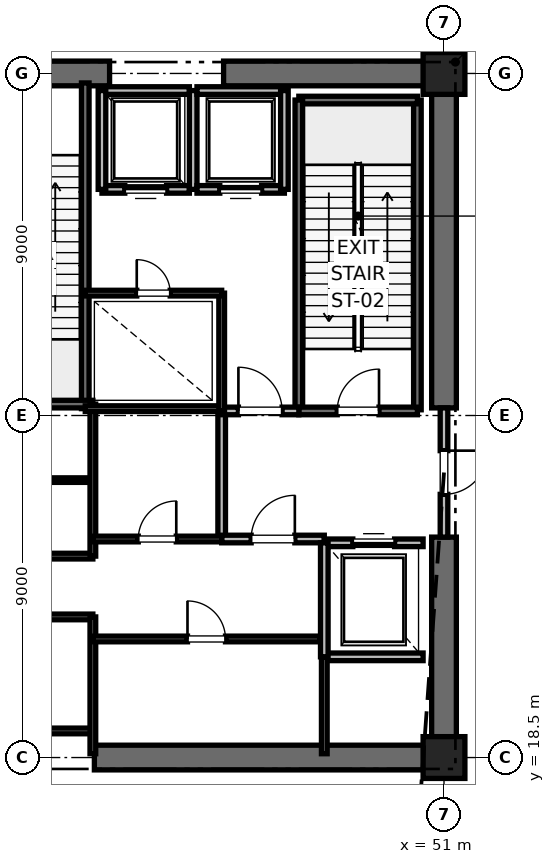
"""IFC4 building model, lengths in metres.
Left out: names, types, materials, properties, quantities, classifications, styles, units other than length and angle.
Written with IfcOpenShell. Run it as: python <this file> out.ifc"""

import sys

from ifc_helpers import new_model, si_unit, direction, frame, frame_2d, origin, origin_2d, place, context, subcontext, project, spatial, rectangle, extrude, element, fill, save


model = new_model("IFC4")
c1 = context("Model", 3, precision=1e-05, world=origin(), true_north=direction((0.0, 1.0)))
c2 = subcontext(c1, "Body", "Model", "MODEL_VIEW")
j1 = project(units=[si_unit("LENGTHUNIT", "METRE"), si_unit("PLANEANGLEUNIT", "RADIAN")], contexts=[c1])
p1 = place(None, origin())
s1 = spatial("IfcSite", under=j1, at=p1, CompositionType="ELEMENT")
p2 = place(p1, origin())
s2 = spatial("IfcBuilding", under=s1, at=p2, CompositionType="ELEMENT")
p3 = place(p2, origin())
s3 = spatial("IfcBuildingStorey", under=s2, at=p3, CompositionType="ELEMENT", Elevation=0.0)
for number, where, z_axis, x_axis in (
    (1, (51.0, 18.5, 0.0), (0.0, 0.0, 1.0), (1.0, 0.0, 0.0)),
    (2, (51.0, 36.5, 0.0), (0.0, 0.0, 1.0), (1.0, 0.0, 0.0)),
):
    element("IfcColumn", number, at=place(p3, frame(where, z_axis=z_axis, x_axis=x_axis)), inside=s3, PredefinedType="PILASTER", context=c2, shape_type="SweptSolid", body=[
        extrude(rectangle(XDim=1.1, YDim=1.1, at=origin_2d()), origin(), (0.0, 0.0, 1.0), 6.0),
    ])
p4 = place(p3, frame((41.8, 18.5, 0.0), z_axis=(0.0, 0.0, 1.0), x_axis=(1.0, 0.0, 0.0)))
e3 = element("IfcWall", 3, at=p4, inside=s3, PredefinedType="SHEAR", context=c2, shape_type="SweptSolid", body=[
    extrude(rectangle(XDim=9.2, YDim=0.65, at=frame_2d((4.6, 0.0))), origin(), (0.0, 0.0, 1.0), 5.72),
])
p5 = place(p3, frame((37.8, 36.5, 0.0), z_axis=(0.0, 0.0, 1.0), x_axis=(1.0, 0.0, 0.0)))
e4 = element("IfcWall", 4, at=p5, inside=s3, PredefinedType="SHEAR", context=c2, shape_type="SweptSolid", body=[
    extrude(rectangle(XDim=4.4, YDim=0.65, at=frame_2d((2.2, 0.0))), origin(), (0.0, 0.0, 1.0), 5.72),
])
p6 = place(p5, frame((1.65, 0.0, 0.0)))
e5 = element("IfcOpeningElement", 5, at=p6, cuts=e4, PredefinedType="OPENING", context=c2, shape_type="SweptSolid", body=[
    extrude(rectangle(XDim=1.1, YDim=2.15, at=frame_2d((0.55, 1.075))), frame((0.0, 0.325, 0.0), z_axis=(0.0, -1.0, 0.0), x_axis=(1.0, 0.0, 0.0)), (0.0, 0.0, 1.0), 0.65),
])
for number, where, z_axis, x_axis in (
    (6, (45.2, 36.5, 0.0), (0.0, 0.0, 1.0), (1.0, 0.0, 0.0)),
    (7, (51.0, 18.5, 0.0), (0.0, 0.0, 1.0), (0.0, 1.0, 0.0)),
):
    element("IfcWall", number, at=place(p3, frame(where, z_axis=z_axis, x_axis=x_axis)), inside=s3, PredefinedType="SHEAR", context=c2, shape_type="SweptSolid", body=[
        extrude(rectangle(XDim=5.8, YDim=0.65, at=frame_2d((2.9, 0.0))), origin(), (0.0, 0.0, 1.0), 5.72),
    ])
p7 = place(p3, frame((51.0, 27.7, 0.0), z_axis=(0.0, 0.0, 1.0), x_axis=(0.0, 1.0, 0.0)))
e8 = element("IfcWall", 8, at=p7, inside=s3, PredefinedType="SHEAR", context=c2, shape_type="SweptSolid", body=[
    extrude(rectangle(XDim=8.8, YDim=0.65, at=frame_2d((4.4, 0.0))), origin(), (0.0, 0.0, 1.0), 5.72),
])
p8 = place(p3, frame((50.3, 27.65, 0.0), z_axis=(0.0, 0.0, 1.0), x_axis=(0.0, 1.0, 0.0)))
e9 = element("IfcWall", 9, at=p8, inside=s3, PredefinedType="SOLIDWALL", context=c2, shape_type="SweptSolid", body=[
    extrude(rectangle(XDim=8.15, YDim=0.2, at=frame_2d((4.075, 0.0))), origin(), (0.0, 0.0, 1.0), 5.72),
])
p9 = place(p3, frame((47.18, 35.8, 0.0), z_axis=(0.0, 0.0, 1.0), x_axis=(1.0, 0.0, 0.0)))
e10 = element("IfcWall", 10, at=p9, inside=s3, PredefinedType="SOLIDWALL", context=c2, shape_type="SweptSolid", body=[
    extrude(rectangle(XDim=3.12, YDim=0.2, at=frame_2d((1.56, 0.0))), origin(), (0.0, 0.0, 1.0), 5.72),
])
p10 = place(p3, frame((47.18, 27.62, 0.0), z_axis=(0.0, 0.0, 1.0), x_axis=(0.0, 1.0, 0.0)))
e11 = element("IfcWall", 11, at=p10, inside=s3, PredefinedType="SOLIDWALL", context=c2, shape_type="SweptSolid", body=[
    extrude(rectangle(XDim=8.18, YDim=0.2, at=frame_2d((4.09, 0.0))), origin(), (0.0, 0.0, 1.0), 5.72),
])
p11 = place(p3, frame((47.18, 27.62, 0.0), z_axis=(0.0, 0.0, 1.0), x_axis=(1.0, 0.0, 0.0)))
e12 = element("IfcWall", 12, at=p11, inside=s3, PredefinedType="SOLIDWALL", context=c2, shape_type="SweptSolid", body=[
    extrude(rectangle(XDim=3.12, YDim=0.2, at=frame_2d((1.56, 0.0))), origin(), (0.0, 0.0, 1.0), 5.72),
])
p12 = place(p11, frame((1.01, 0.0, 0.0)))
e13 = element("IfcOpeningElement", 13, at=p12, cuts=e12, PredefinedType="OPENING", context=c2, shape_type="SweptSolid", body=[
    extrude(rectangle(XDim=1.1, YDim=2.15, at=frame_2d((0.55, 1.075))), frame((0.0, 0.1, 0.0), z_axis=(0.0, -1.0, 0.0), x_axis=(1.0, 0.0, 0.0)), (0.0, 0.0, 1.0), 0.2),
])
p13 = place(p3, frame((41.56, 27.68, 0.0), z_axis=(0.0, 0.0, 1.0), x_axis=(0.0, 1.0, 0.0)))
e14 = element("IfcWall", 14, at=p13, inside=s3, PredefinedType="SOLIDWALL", context=c2, shape_type="SweptSolid", body=[
    extrude(rectangle(XDim=8.57, YDim=0.2, at=frame_2d((4.285, 0.0))), origin(), (0.0, 0.0, 1.0), 5.72),
])
p14 = place(p3, frame((38.44, 27.8, 0.0), z_axis=(0.0, 0.0, 1.0), x_axis=(1.0, 0.0, 0.0)))
e15 = element("IfcWall", 15, at=p14, inside=s3, PredefinedType="SOLIDWALL", context=c2, shape_type="SweptSolid", body=[
    extrude(rectangle(XDim=3.32, YDim=0.2, at=frame_2d((1.66, 0.0))), origin(), (0.0, 0.0, 1.0), 5.72),
])
p15 = place(p3, frame((45.15, 24.25, 0.0), z_axis=(0.0, 0.0, 1.0), x_axis=(0.0, 1.0, 0.0)))
e16 = element("IfcWall", 16, at=p15, inside=s3, PredefinedType="PARTITIONING", context=c2, shape_type="SweptSolid", body=[
    extrude(rectangle(XDim=3.37, YDim=0.2, at=frame_2d((1.685, 0.0))), origin(), (0.0, 0.0, 1.0), 5.72),
])
p16 = place(p3, frame((45.15, 24.25, 0.0), z_axis=(0.0, 0.0, 1.0), x_axis=(1.0, 0.0, 0.0)))
e17 = element("IfcWall", 17, at=p16, inside=s3, PredefinedType="PARTITIONING", context=c2, shape_type="SweptSolid", body=[
    extrude(rectangle(XDim=2.7, YDim=0.2, at=frame_2d((1.35, 0.0))), origin(), (0.0, 0.0, 1.0), 5.72),
])
p17 = place(p16, frame((0.775, 0.0, 0.0)))
e18 = element("IfcOpeningElement", 18, at=p17, cuts=e17, PredefinedType="OPENING", context=c2, shape_type="SweptSolid", body=[
    extrude(rectangle(XDim=1.15, YDim=2.2, at=frame_2d((0.575, 1.1))), frame((0.0, 0.1, 0.0), z_axis=(0.0, -1.0, 0.0), x_axis=(1.0, 0.0, 0.0)), (0.0, 0.0, 1.0), 0.2),
])
p18 = place(p3, frame((45.15, 27.62, 0.0), z_axis=(0.0, 0.0, 1.0), x_axis=(1.0, 0.0, 0.0)))
e19 = element("IfcWall", 19, at=p18, inside=s3, PredefinedType="PARTITIONING", context=c2, shape_type="SweptSolid", body=[
    extrude(rectangle(XDim=2.03, YDim=0.2, at=frame_2d((1.015, 0.0))), origin(), (0.0, 0.0, 1.0), 5.72),
])
p19 = place(p18, frame((0.44, 0.0, 0.0)))
e20 = element("IfcOpeningElement", 20, at=p19, cuts=e19, PredefinedType="OPENING", context=c2, shape_type="SweptSolid", body=[
    extrude(rectangle(XDim=1.15, YDim=2.2, at=frame_2d((0.575, 1.1))), frame((0.0, 0.1, 0.0), z_axis=(0.0, -1.0, 0.0), x_axis=(1.0, 0.0, 0.0)), (0.0, 0.0, 1.0), 0.2),
])
p20 = place(p3, frame((51.0, 27.7, 0.0), z_axis=(0.0, 0.0, 1.0), x_axis=(0.0, -1.0, 0.0)))
e21 = element("IfcWall", 21, at=p20, inside=s3, PredefinedType="PARTITIONING", context=c2, shape_type="SweptSolid", body=[
    extrude(rectangle(XDim=3.4, YDim=0.2, at=frame_2d((1.7, 0.0))), origin(), (0.0, 0.0, 1.0), 4.5),
])
p21 = place(p20, frame((1.125, 0.0, 0.0)))
e22 = element("IfcOpeningElement", 22, at=p21, cuts=e21, PredefinedType="OPENING", context=c2, shape_type="SweptSolid", body=[
    extrude(rectangle(XDim=1.15, YDim=2.2, at=frame_2d((0.575, 1.1))), frame((0.0, 0.1, 0.0), z_axis=(0.0, -1.0, 0.0), x_axis=(1.0, 0.0, 0.0)), (0.0, 0.0, 1.0), 0.2),
])
p22 = place(p3, frame((47.85, 21.15, 0.0), z_axis=(0.0, 0.0, 1.0), x_axis=(1.0, 0.0, 0.0)))
e23 = element("IfcWall", 23, at=p22, inside=s3, PredefinedType="SOLIDWALL", context=c2, shape_type="SweptSolid", body=[
    extrude(rectangle(XDim=2.6, YDim=0.2, at=frame_2d((1.3, 0.0))), origin(), (0.0, 0.0, 1.0), 5.72),
])
p23 = place(p3, frame((50.45, 24.15, 0.0), z_axis=(0.0, 0.0, 1.0), x_axis=(-1.0, 0.0, 0.0)))
e24 = element("IfcWall", 24, at=p23, inside=s3, PredefinedType="SOLIDWALL", context=c2, shape_type="SweptSolid", body=[
    extrude(rectangle(XDim=2.6, YDim=0.2, at=frame_2d((1.3, 0.0))), origin(), (0.0, 0.0, 1.0), 4.5),
])
p24 = place(p23, frame((0.75, 0.0, 0.0)))
e25 = element("IfcOpeningElement", 25, at=p24, cuts=e24, PredefinedType="OPENING", context=c2, shape_type="SweptSolid", body=[
    extrude(rectangle(XDim=1.1, YDim=2.2, at=frame_2d((0.55, 1.1))), frame((0.0, 0.1, 0.0), z_axis=(0.0, -1.0, 0.0), x_axis=(1.0, 0.0, 0.0)), (0.0, 0.0, 1.0), 0.2),
])
p25 = place(p3, frame((47.85, 24.15, 0.0), z_axis=(0.0, 0.0, 1.0), x_axis=(0.0, -1.0, 0.0)))
e26 = element("IfcWall", 26, at=p25, inside=s3, PredefinedType="SOLIDWALL", context=c2, shape_type="SweptSolid", body=[
    extrude(rectangle(XDim=3.0, YDim=0.2, at=frame_2d((1.5, 0.0))), origin(), (0.0, 0.0, 1.0), 5.72),
])
p26 = place(p3, frame((42.0, 33.45, 0.0), z_axis=(0.0, 0.0, 1.0), x_axis=(1.0, 0.0, 0.0)))
e27 = element("IfcWall", 27, at=p26, inside=s3, PredefinedType="SOLIDWALL", context=c2, shape_type="SweptSolid", body=[
    extrude(rectangle(XDim=2.3, YDim=0.2, at=frame_2d((1.15, 0.0))), origin(), (0.0, 0.0, 1.0), 5.72),
])
p27 = place(p26, frame((0.6, 0.0, 0.0)))
e28 = element("IfcOpeningElement", 28, at=p27, cuts=e27, PredefinedType="OPENING", context=c2, shape_type="SweptSolid", body=[
    extrude(rectangle(XDim=1.1, YDim=2.2, at=frame_2d((0.55, 1.1))), frame((0.0, 0.1, 0.0), z_axis=(0.0, -1.0, 0.0), x_axis=(1.0, 0.0, 0.0)), (0.0, 0.0, 1.0), 0.2),
])
p28 = place(p3, frame((44.3, 36.05, 0.0), z_axis=(0.0, 0.0, 1.0), x_axis=(-1.0, 0.0, 0.0)))
e29 = element("IfcWall", 29, at=p28, inside=s3, PredefinedType="SOLIDWALL", context=c2, shape_type="SweptSolid", body=[
    extrude(rectangle(XDim=2.3, YDim=0.2, at=frame_2d((1.15, 0.0))), origin(), (0.0, 0.0, 1.0), 4.5),
])
for number, where, z_axis, x_axis in (
    (30, (42.0, 36.05, 0.0), (0.0, 0.0, 1.0), (0.0, -1.0, 0.0)),
    (31, (44.4, 33.45, 0.0), (0.0, 0.0, 1.0), (0.0, 1.0, 0.0)),
):
    element("IfcWall", number, at=place(p3, frame(where, z_axis=z_axis, x_axis=x_axis)), inside=s3, PredefinedType="SOLIDWALL", context=c2, shape_type="SweptSolid", body=[
        extrude(rectangle(XDim=2.6, YDim=0.2, at=frame_2d((1.3, 0.0))), origin(), (0.0, 0.0, 1.0), 4.5),
    ])
p29 = place(p3, frame((44.5, 33.45, 0.0), z_axis=(0.0, 0.0, 1.0), x_axis=(1.0, 0.0, 0.0)))
e32 = element("IfcWall", 32, at=p29, inside=s3, PredefinedType="SOLIDWALL", context=c2, shape_type="SweptSolid", body=[
    extrude(rectangle(XDim=2.3, YDim=0.2, at=frame_2d((1.15, 0.0))), origin(), (0.0, 0.0, 1.0), 5.72),
])
p30 = place(p29, frame((0.6, 0.0, 0.0)))
e33 = element("IfcOpeningElement", 33, at=p30, cuts=e32, PredefinedType="OPENING", context=c2, shape_type="SweptSolid", body=[
    extrude(rectangle(XDim=1.1, YDim=2.2, at=frame_2d((0.55, 1.1))), frame((0.0, 0.1, 0.0), z_axis=(0.0, -1.0, 0.0), x_axis=(1.0, 0.0, 0.0)), (0.0, 0.0, 1.0), 0.2),
])
p31 = place(p3, frame((46.8, 36.05, 0.0), z_axis=(0.0, 0.0, 1.0), x_axis=(-1.0, 0.0, 0.0)))
e34 = element("IfcWall", 34, at=p31, inside=s3, PredefinedType="SOLIDWALL", context=c2, shape_type="SweptSolid", body=[
    extrude(rectangle(XDim=2.3, YDim=0.2, at=frame_2d((1.15, 0.0))), origin(), (0.0, 0.0, 1.0), 4.5),
])
p32 = place(p3, frame((46.8, 33.45, 0.0), z_axis=(0.0, 0.0, 1.0), x_axis=(0.0, 1.0, 0.0)))
e35 = element("IfcWall", 35, at=p32, inside=s3, PredefinedType="SOLIDWALL", context=c2, shape_type="SweptSolid", body=[
    extrude(rectangle(XDim=2.6, YDim=0.2, at=frame_2d((1.3, 0.0))), origin(), (0.0, 0.0, 1.0), 5.72),
])
for number, where, z_axis, x_axis in (
    (36, (39.95, 19.2, 0.0), (0.0, 0.0, 1.0), (1.0, 0.0, 0.0)),
    (37, (39.95, 22.2, 0.0), (0.0, 0.0, 1.0), (1.0, 0.0, 0.0)),
    (38, (39.95, 23.8, 0.0), (0.0, 0.0, 1.0), (1.0, 0.0, 0.0)),
):
    element("IfcWall", number, at=place(p3, frame(where, z_axis=z_axis, x_axis=x_axis)), inside=s3, PredefinedType="PARTITIONING", context=c2, shape_type="SweptSolid", body=[
        extrude(rectangle(XDim=1.81, YDim=0.15, at=frame_2d((0.905, 0.0))), origin(), (0.0, 0.0, 1.0), 2.85),
    ])
p33 = place(p3, frame((39.95, 25.8, 0.0), z_axis=(0.0, 0.0, 1.0), x_axis=(1.0, 0.0, 0.0)))
e39 = element("IfcWall", 39, at=p33, inside=s3, PredefinedType="PARTITIONING", context=c2, shape_type="SweptSolid", body=[
    extrude(rectangle(XDim=1.81, YDim=0.12, at=frame_2d((0.905, 0.0))), origin(), (0.0, 0.0, 1.0), 2.85),
])
p34 = place(p3, frame((41.76, 18.6, 0.0), z_axis=(0.0, 0.0, 1.0), x_axis=(0.0, 1.0, 0.0)))
e40 = element("IfcWall", 40, at=p34, inside=s3, PredefinedType="PARTITIONING", context=c2, shape_type="SweptSolid", body=[
    extrude(rectangle(XDim=3.6, YDim=0.15, at=frame_2d((1.8, 0.0))), origin(), (0.0, 0.0, 1.0), 2.85),
])
p35 = place(p3, frame((41.76, 23.8, 0.0), z_axis=(0.0, 0.0, 1.0), x_axis=(0.0, 1.0, 0.0)))
e41 = element("IfcWall", 41, at=p35, inside=s3, PredefinedType="PARTITIONING", context=c2, shape_type="SweptSolid", body=[
    extrude(rectangle(XDim=4.0, YDim=0.15, at=frame_2d((2.0, 0.0))), origin(), (0.0, 0.0, 1.0), 2.85),
])
p36 = place(p3, frame((41.56, 27.68, 0.0), z_axis=(0.0, 0.0, 1.0), x_axis=(1.0, 0.0, 0.0)))
e42 = element("IfcWall", 42, at=p36, inside=s3, PredefinedType="PARTITIONING", context=c2, shape_type="SweptSolid", body=[
    extrude(rectangle(XDim=3.59, YDim=0.15, at=frame_2d((1.795, 0.0))), origin(), (0.0, 0.0, 1.0), 2.85),
])
p37 = place(p3, frame((47.85, 18.6, 0.0), z_axis=(0.0, 0.0, 1.0), x_axis=(0.0, 1.0, 0.0)))
e43 = element("IfcWall", 43, at=p37, inside=s3, PredefinedType="PARTITIONING", context=c2, shape_type="SweptSolid", body=[
    extrude(rectangle(XDim=2.54, YDim=0.15, at=frame_2d((1.27, 0.0))), origin(), (0.0, 0.0, 1.0), 2.85),
])
p38 = place(p3, frame((41.76, 21.62, 0.0), z_axis=(0.0, 0.0, 1.0), x_axis=(1.0, 0.0, 0.0)))
e44 = element("IfcWall", 44, at=p38, inside=s3, PredefinedType="PARTITIONING", context=c2, shape_type="SweptSolid", body=[
    extrude(rectangle(XDim=5.98, YDim=0.15, at=frame_2d((2.99, 0.0))), origin(), (0.0, 0.0, 1.0), 2.85),
])
p39 = place(p38, frame((2.49, 0.0, 0.0)))
e45 = element("IfcOpeningElement", 45, at=p39, cuts=e44, PredefinedType="OPENING", context=c2, shape_type="SweptSolid", body=[
    extrude(rectangle(XDim=1.0, YDim=2.15, at=frame_2d((0.5, 1.075))), frame((0.0, 0.075, 0.0), z_axis=(0.0, -1.0, 0.0), x_axis=(1.0, 0.0, 0.0)), (0.0, 0.0, 1.0), 0.15),
])
p40 = place(p3, frame((41.76, 24.25, 0.0), z_axis=(0.0, 0.0, 1.0), x_axis=(1.0, 0.0, 0.0)))
e46 = element("IfcWall", 46, at=p40, inside=s3, PredefinedType="PARTITIONING", context=c2, shape_type="SweptSolid", body=[
    extrude(rectangle(XDim=3.39, YDim=0.15, at=frame_2d((1.695, 0.0))), origin(), (0.0, 0.0, 1.0), 2.85),
])
p41 = place(p40, frame((1.195, 0.0, 0.0)))
e47 = element("IfcOpeningElement", 47, at=p41, cuts=e46, PredefinedType="OPENING", context=c2, shape_type="SweptSolid", body=[
    extrude(rectangle(XDim=1.0, YDim=2.15, at=frame_2d((0.5, 1.075))), frame((0.0, 0.075, 0.0), z_axis=(0.0, -1.0, 0.0), x_axis=(1.0, 0.0, 0.0)), (0.0, 0.0, 1.0), 0.15),
])
p42 = place(p3, frame((45.15, 27.62, 0.0), z_axis=(0.0, 0.0, 1.0), x_axis=(0.0, 1.0, 0.0)))
e48 = element("IfcWall", 48, at=p42, inside=s3, PredefinedType="PARTITIONING", context=c2, shape_type="SweptSolid", body=[
    extrude(rectangle(XDim=3.1, YDim=0.15, at=frame_2d((1.55, 0.0))), origin(), (0.0, 0.0, 1.0), 2.85),
])
p43 = place(p3, frame((41.56, 30.72, 0.0), z_axis=(0.0, 0.0, 1.0), x_axis=(1.0, 0.0, 0.0)))
e49 = element("IfcWall", 49, at=p43, inside=s3, PredefinedType="PARTITIONING", context=c2, shape_type="SweptSolid", body=[
    extrude(rectangle(XDim=3.59, YDim=0.15, at=frame_2d((1.795, 0.0))), origin(), (0.0, 0.0, 1.0), 2.85),
])
p44 = place(p43, frame((1.355, 0.0, 0.0)))
e50 = element("IfcOpeningElement", 50, at=p44, cuts=e49, PredefinedType="OPENING", context=c2, shape_type="SweptSolid", body=[
    extrude(rectangle(XDim=0.88, YDim=2.1, at=frame_2d((0.44, 1.05))), frame((0.0, 0.075, 0.0), z_axis=(0.0, -1.0, 0.0), x_axis=(1.0, 0.0, 0.0)), (0.0, 0.0, 1.0), 0.15),
])
p45 = place(p3, frame((51.18, 39.35, 0.0), z_axis=(0.0, 0.0, 1.0), x_axis=(0.0, -1.0, 0.0)))
e51 = element("IfcWall", 51, at=p45, inside=s3, PredefinedType="PARTITIONING", context=c2, shape_type="SweptSolid", body=[
    extrude(rectangle(XDim=2.75, YDim=0.15, at=frame_2d((1.375, 0.0))), origin(), (0.0, 0.0, 1.0), 2.85),
])
p46 = place(p45, frame((0.8, 0.0, 0.0)))
e52 = element("IfcOpeningElement", 52, at=p46, cuts=e51, PredefinedType="OPENING", context=c2, shape_type="SweptSolid", body=[
    extrude(rectangle(XDim=1.15, YDim=2.2, at=frame_2d((0.575, 1.1))), frame((0.0, 0.075, 0.0), z_axis=(0.0, -1.0, 0.0), x_axis=(1.0, 0.0, 0.0)), (0.0, 0.0, 1.0), 0.15),
])
p47 = place(p12, origin())
e53 = element("IfcDoor", 53, at=p47, inside=s3, OperationType="SINGLE_SWING_RIGHT", PredefinedType="DOOR", context=c2, shape_type="SweptSolid", body=[
    extrude(rectangle(XDim=1.1, YDim=2.15, at=frame_2d((0.55, 1.075))), frame((0.0, 0.025, 0.0), z_axis=(0.0, -1.0, 0.0), x_axis=(1.0, 0.0, 0.0)), (0.0, 0.0, 1.0), 0.05),
])
fill(e13, e53)
p48 = place(p17, origin())
e54 = element("IfcDoor", 54, at=p48, inside=s3, OperationType="SINGLE_SWING_RIGHT", PredefinedType="DOOR", context=c2, shape_type="SweptSolid", body=[
    extrude(rectangle(XDim=1.15, YDim=2.2, at=frame_2d((0.575, 1.1))), frame((0.0, 0.025, 0.0), z_axis=(0.0, -1.0, 0.0), x_axis=(1.0, 0.0, 0.0)), (0.0, 0.0, 1.0), 0.05),
])
fill(e18, e54)
p49 = place(p19, origin())
e55 = element("IfcDoor", 55, at=p49, inside=s3, OperationType="SINGLE_SWING_LEFT", PredefinedType="DOOR", context=c2, shape_type="SweptSolid", body=[
    extrude(rectangle(XDim=1.15, YDim=2.2, at=frame_2d((0.575, 1.1))), frame((0.0, 0.025, 0.0), z_axis=(0.0, -1.0, 0.0), x_axis=(1.0, 0.0, 0.0)), (0.0, 0.0, 1.0), 0.05),
])
fill(e20, e55)
p50 = place(p21, origin())
e56 = element("IfcDoor", 56, at=p50, inside=s3, OperationType="SINGLE_SWING_LEFT", PredefinedType="DOOR", context=c2, shape_type="SweptSolid", body=[
    extrude(rectangle(XDim=1.15, YDim=2.2, at=frame_2d((0.575, 1.1))), frame((0.0, 0.025, 0.0), z_axis=(0.0, -1.0, 0.0), x_axis=(1.0, 0.0, 0.0)), (0.0, 0.0, 1.0), 0.05),
])
fill(e22, e56)
p51 = place(p24, origin())
e57 = element("IfcDoor", 57, at=p51, inside=s3, OperationType="SLIDING_TO_RIGHT", PredefinedType="DOOR", context=c2, shape_type="SweptSolid", body=[
    extrude(rectangle(XDim=1.1, YDim=2.2, at=frame_2d((0.55, 1.1))), frame((0.0, 0.025, 0.0), z_axis=(0.0, -1.0, 0.0), x_axis=(1.0, 0.0, 0.0)), (0.0, 0.0, 1.0), 0.05),
])
fill(e25, e57)
p52 = place(p27, origin())
e58 = element("IfcDoor", 58, at=p52, inside=s3, OperationType="SLIDING_TO_RIGHT", PredefinedType="DOOR", context=c2, shape_type="SweptSolid", body=[
    extrude(rectangle(XDim=1.1, YDim=2.2, at=frame_2d((0.55, 1.1))), frame((0.0, 0.025, 0.0), z_axis=(0.0, -1.0, 0.0), x_axis=(1.0, 0.0, 0.0)), (0.0, 0.0, 1.0), 0.05),
])
fill(e28, e58)
p53 = place(p30, origin())
e59 = element("IfcDoor", 59, at=p53, inside=s3, OperationType="SLIDING_TO_RIGHT", PredefinedType="DOOR", context=c2, shape_type="SweptSolid", body=[
    extrude(rectangle(XDim=1.1, YDim=2.2, at=frame_2d((0.55, 1.1))), frame((0.0, 0.025, 0.0), z_axis=(0.0, -1.0, 0.0), x_axis=(1.0, 0.0, 0.0)), (0.0, 0.0, 1.0), 0.05),
])
fill(e33, e59)
p54 = place(p39, origin())
e60 = element("IfcDoor", 60, at=p54, inside=s3, OperationType="SINGLE_SWING_LEFT", PredefinedType="DOOR", context=c2, shape_type="SweptSolid", body=[
    extrude(rectangle(XDim=1.0, YDim=2.15, at=frame_2d((0.5, 1.075))), frame((0.0, 0.025, 0.0), z_axis=(0.0, -1.0, 0.0), x_axis=(1.0, 0.0, 0.0)), (0.0, 0.0, 1.0), 0.05),
])
fill(e45, e60)
p55 = place(p41, origin())
e61 = element("IfcDoor", 61, at=p55, inside=s3, OperationType="SINGLE_SWING_RIGHT", PredefinedType="DOOR", context=c2, shape_type="SweptSolid", body=[
    extrude(rectangle(XDim=1.0, YDim=2.15, at=frame_2d((0.5, 1.075))), frame((0.0, 0.025, 0.0), z_axis=(0.0, -1.0, 0.0), x_axis=(1.0, 0.0, 0.0)), (0.0, 0.0, 1.0), 0.05),
])
fill(e47, e61)
p56 = place(p44, origin())
e62 = element("IfcDoor", 62, at=p56, inside=s3, OperationType="SINGLE_SWING_LEFT", PredefinedType="DOOR", context=c2, shape_type="SweptSolid", body=[
    extrude(rectangle(XDim=0.88, YDim=2.1, at=frame_2d((0.44, 1.05))), frame((0.0, 0.025, 0.0), z_axis=(0.0, -1.0, 0.0), x_axis=(1.0, 0.0, 0.0)), (0.0, 0.0, 1.0), 0.05),
])
fill(e50, e62)
save(model, sys.argv[1])
